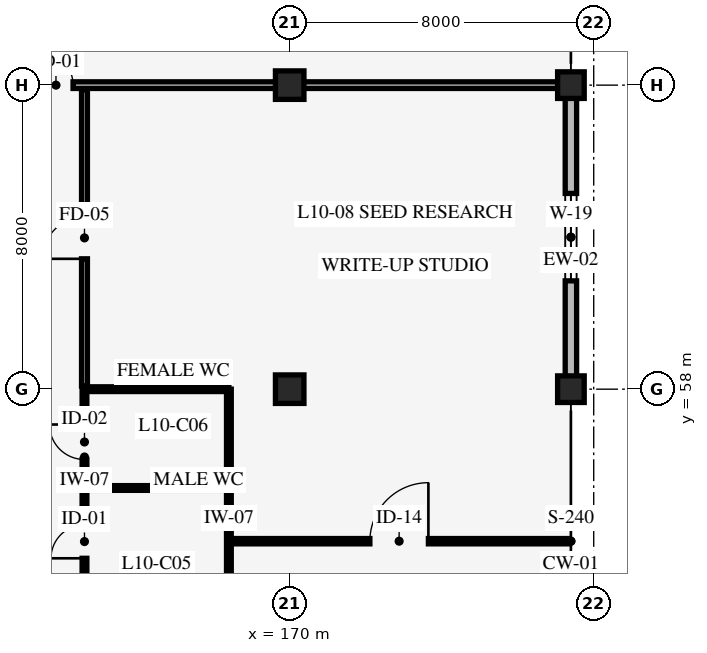
"""IFC4 building model, lengths in metres.
Left out: names, types, materials, properties, quantities, classifications, styles, units other than length and angle.
Written with IfcOpenShell. Run it as: python <this file> out.ifc"""

import sys

from ifc_helpers import new_model, si_unit, direction, frame, frame_2d, origin, origin_2d, place, context, subcontext, project, spatial, rectangle, extrude, element, fill, save


model = new_model("IFC4")
c1 = context("Model", 3, precision=1e-05, world=origin(), true_north=direction((0.0, 1.0)))
c2 = subcontext(c1, "Body", "Model", "MODEL_VIEW")
j1 = project(units=[si_unit("LENGTHUNIT", "METRE"), si_unit("PLANEANGLEUNIT", "RADIAN")], contexts=[c1])
p1 = place(None, origin())
s1 = spatial("IfcSite", under=j1, at=p1, CompositionType="ELEMENT")
p2 = place(p1, origin())
s2 = spatial("IfcBuilding", under=s1, at=p2, CompositionType="ELEMENT")
p3 = place(p2, frame((0.0, 0.0, 40.2)))
s3 = spatial("IfcBuildingStorey", under=s2, at=p3, CompositionType="ELEMENT", Elevation=40.2)
for number, where, z_axis, x_axis in (
    (1, (170.0, 58.0, 0.0), (0.0, 0.0, 1.0), (1.0, 0.0, 0.0)),
    (2, (170.0, 66.0, 0.0), (0.0, 0.0, 1.0), (1.0, 0.0, 0.0)),
):
    element("IfcColumn", number, at=place(p3, frame(where, z_axis=z_axis, x_axis=x_axis)), inside=s3, PredefinedType="COLUMN", context=c2, shape_type="SweptSolid", body=[
        extrude(rectangle(XDim=0.75, YDim=0.75, at=origin_2d()), origin(), (0.0, 0.0, 1.0), 4.2),
    ])
for number, where, z_axis, x_axis in (
    (3, (177.4, 58.0, 0.0), (0.0, 0.0, 1.0), (1.0, 0.0, 0.0)),
    (4, (177.4, 66.0, 0.0), (0.0, 0.0, 1.0), (1.0, 0.0, 0.0)),
):
    element("IfcColumn", number, at=place(p3, frame(where, z_axis=z_axis, x_axis=x_axis)), inside=s3, PredefinedType="COLUMN", context=c2, shape_type="SweptSolid", body=[
        extrude(rectangle(XDim=0.7, YDim=0.7, at=origin_2d()), origin(), (0.0, 0.0, 1.0), 4.2),
    ])
p4 = place(p3, frame((177.4, 66.0, 0.0), z_axis=(0.0, 0.0, 1.0), x_axis=(0.0, -1.0, 0.0)))
e5 = element("IfcWall", 5, at=p4, inside=s3, PredefinedType="STANDARD", context=c2, shape_type="SweptSolid", body=[
    extrude(rectangle(XDim=8.0, YDim=0.3, at=frame_2d((4.0, 0.0))), origin(), (0.0, 0.0, 1.0), 3.14),
])
p5 = place(p4, frame((2.85, 0.0, 0.85)))
e6 = element("IfcOpeningElement", 6, at=p5, cuts=e5, PredefinedType="OPENING", context=c2, shape_type="SweptSolid", body=[
    extrude(rectangle(XDim=2.3, YDim=1.5, at=frame_2d((1.15, 0.75))), frame((0.0, 0.16, 0.0), z_axis=(0.0, -1.0, 0.0), x_axis=(1.0, 0.0, 0.0)), (0.0, 0.0, 1.0), 0.32),
])
p6 = place(p3, frame((164.6, 50.0, 0.0), z_axis=(0.0, 0.0, 1.0), x_axis=(0.0, 1.0, 0.0)))
e7 = element("IfcWall", 7, at=p6, inside=s3, PredefinedType="STANDARD", context=c2, shape_type="SweptSolid", body=[
    extrude(rectangle(XDim=8.0, YDim=0.125, at=frame_2d((4.0, 0.0))), origin(), (0.0, 0.0, 1.0), 3.9),
])
p7 = place(p6, frame((0.9, 0.0, 0.0)))
e8 = element("IfcOpeningElement", 8, at=p7, cuts=e7, PredefinedType="OPENING", context=c2, shape_type="SweptSolid", body=[
    extrude(rectangle(XDim=0.96, YDim=2.08, at=frame_2d((0.48, 1.04))), frame((0.0, 0.073, 0.0), z_axis=(0.0, -1.0, 0.0), x_axis=(1.0, 0.0, 0.0)), (0.0, 0.0, 1.0), 0.145),
])
p8 = place(p6, frame((3.55, 0.0, 0.0)))
e9 = element("IfcOpeningElement", 9, at=p8, cuts=e7, PredefinedType="OPENING", context=c2, shape_type="SweptSolid", body=[
    extrude(rectangle(XDim=0.88, YDim=2.05, at=frame_2d((0.44, 1.025))), frame((0.0, 0.073, 0.0), z_axis=(0.0, -1.0, 0.0), x_axis=(1.0, 0.0, 0.0)), (0.0, 0.0, 1.0), 0.145),
])
p9 = place(p6, frame((6.15, 0.0, 0.0)))
e10 = element("IfcOpeningElement", 10, at=p9, cuts=e7, PredefinedType="OPENING", context=c2, shape_type="SweptSolid", body=[
    extrude(rectangle(XDim=0.92, YDim=2.05, at=frame_2d((0.46, 1.025))), frame((0.0, 0.073, 0.0), z_axis=(0.0, -1.0, 0.0), x_axis=(1.0, 0.0, 0.0)), (0.0, 0.0, 1.0), 0.145),
])
p10 = place(p3, frame((168.4, 50.0, 0.0), z_axis=(0.0, 0.0, 1.0), x_axis=(0.0, 1.0, 0.0)))
e11 = element("IfcWall", 11, at=p10, inside=s3, PredefinedType="STANDARD", context=c2, shape_type="SweptSolid", body=[
    extrude(rectangle(XDim=8.0, YDim=0.125, at=frame_2d((4.0, 0.0))), origin(), (0.0, 0.0, 1.0), 3.9),
])
p11 = place(p3, frame((164.6, 55.4, 0.0), z_axis=(0.0, 0.0, 1.0), x_axis=(1.0, 0.0, 0.0)))
e12 = element("IfcWall", 12, at=p11, inside=s3, PredefinedType="STANDARD", context=c2, shape_type="SweptSolid", body=[
    extrude(rectangle(XDim=3.8, YDim=0.125, at=frame_2d((1.9, 0.0))), origin(), (0.0, 0.0, 1.0), 3.9),
])
p12 = place(p3, frame((164.6, 58.0, 0.0), z_axis=(0.0, 0.0, 1.0), x_axis=(1.0, 0.0, 0.0)))
e13 = element("IfcWall", 13, at=p12, inside=s3, PredefinedType="STANDARD", context=c2, shape_type="SweptSolid", body=[
    extrude(rectangle(XDim=3.8, YDim=0.125, at=frame_2d((1.9, 0.0))), origin(), (0.0, 0.0, 1.0), 3.09),
])
p13 = place(p3, frame((168.4, 54.0, 0.0), z_axis=(0.0, 0.0, 1.0), x_axis=(1.0, 0.0, 0.0)))
e14 = element("IfcWall", 14, at=p13, inside=s3, PredefinedType="STANDARD", context=c2, shape_type="SweptSolid", body=[
    extrude(rectangle(XDim=8.96, YDim=0.14, at=frame_2d((4.48, 0.0))), origin(), (0.0, 0.0, 1.0), 3.9),
])
p14 = place(p13, frame((3.71, 0.0, 0.0)))
e15 = element("IfcOpeningElement", 15, at=p14, cuts=e14, PredefinedType="OPENING", context=c2, shape_type="SweptSolid", body=[
    extrude(rectangle(XDim=1.54, YDim=2.22, at=frame_2d((0.77, 1.11))), frame((0.0, 0.08, 0.0), z_axis=(0.0, -1.0, 0.0), x_axis=(1.0, 0.0, 0.0)), (0.0, 0.0, 1.0), 0.16),
])
p15 = place(p3, frame((164.6, 58.08, 0.0), z_axis=(0.0, 0.0, 1.0), x_axis=(0.0, 1.0, 0.0)))
e16 = element("IfcWall", 16, at=p15, inside=s3, PredefinedType="STANDARD", context=c2, shape_type="SweptSolid", body=[
    extrude(rectangle(XDim=7.8, YDim=0.155, at=frame_2d((3.9, 0.0))), origin(), (0.0, 0.0, 1.0), 3.9),
])
p16 = place(p15, frame((3.35, 0.0, 0.0)))
e17 = element("IfcOpeningElement", 17, at=p16, cuts=e16, PredefinedType="OPENING", context=c2, shape_type="SweptSolid", body=[
    extrude(rectangle(XDim=1.1, YDim=2.1, at=frame_2d((0.55, 1.05))), frame((0.0, 0.087, 0.0), z_axis=(0.0, -1.0, 0.0), x_axis=(1.0, 0.0, 0.0)), (0.0, 0.0, 1.0), 0.175),
])
p17 = place(p3, frame((162.35, 66.0, 0.0), z_axis=(0.0, 0.0, 1.0), x_axis=(1.0, 0.0, 0.0)))
e18 = element("IfcWall", 18, at=p17, inside=s3, PredefinedType="STANDARD", context=c2, shape_type="SweptSolid", body=[
    extrude(rectangle(XDim=14.7, YDim=0.175, at=frame_2d((7.35, 0.0))), origin(), (0.0, 0.0, 1.0), 3.09),
])
p18 = place(p17, frame((1.05, 0.0, 0.0)))
e19 = element("IfcOpeningElement", 19, at=p18, cuts=e18, PredefinedType="OPENING", context=c2, shape_type="SweptSolid", body=[
    extrude(rectangle(XDim=0.9, YDim=2.1, at=frame_2d((0.45, 1.05))), frame((0.0, 0.098, 0.0), z_axis=(0.0, -1.0, 0.0), x_axis=(1.0, 0.0, 0.0)), (0.0, 0.0, 1.0), 0.195),
])
p19 = place(p5, origin())
e20 = element("IfcWindow", 20, at=p19, inside=s3, PartitioningType="SINGLE_PANEL", PredefinedType="WINDOW", context=c2, shape_type="SweptSolid", body=[
    extrude(rectangle(XDim=2.3, YDim=1.5, at=frame_2d((1.15, 0.75))), frame((0.0, 0.03, 0.0), z_axis=(0.0, -1.0, 0.0), x_axis=(1.0, 0.0, 0.0)), (0.0, 0.0, 1.0), 0.06),
])
fill(e6, e20)
p20 = place(p8, origin())
e21 = element("IfcDoor", 21, at=p20, inside=s3, OperationType="SINGLE_SWING_LEFT", PredefinedType="DOOR", context=c2, shape_type="SweptSolid", body=[
    extrude(rectangle(XDim=0.88, YDim=2.05, at=frame_2d((0.44, 1.025))), frame((0.0, 0.025, 0.0), z_axis=(0.0, -1.0, 0.0), x_axis=(1.0, 0.0, 0.0)), (0.0, 0.0, 1.0), 0.05),
])
fill(e9, e21)
p21 = place(p9, origin())
e22 = element("IfcDoor", 22, at=p21, inside=s3, OperationType="SINGLE_SWING_RIGHT", PredefinedType="DOOR", context=c2, shape_type="SweptSolid", body=[
    extrude(rectangle(XDim=0.92, YDim=2.05, at=frame_2d((0.46, 1.025))), frame((0.0, 0.025, 0.0), z_axis=(0.0, -1.0, 0.0), x_axis=(1.0, 0.0, 0.0)), (0.0, 0.0, 1.0), 0.05),
])
fill(e10, e22)
p22 = place(p14, origin())
e23 = element("IfcDoor", 23, at=p22, inside=s3, OperationType="SINGLE_SWING_RIGHT", PredefinedType="DOOR", context=c2, shape_type="SweptSolid", body=[
    extrude(rectangle(XDim=1.54, YDim=2.22, at=frame_2d((0.77, 1.11))), frame((0.0, 0.025, 0.0), z_axis=(0.0, -1.0, 0.0), x_axis=(1.0, 0.0, 0.0)), (0.0, 0.0, 1.0), 0.05),
])
fill(e15, e23)
p23 = place(p16, origin())
e24 = element("IfcDoor", 24, at=p23, inside=s3, OperationType="SINGLE_SWING_LEFT", PredefinedType="DOOR", context=c2, shape_type="SweptSolid", body=[
    extrude(rectangle(XDim=1.1, YDim=2.1, at=frame_2d((0.55, 1.05))), frame((0.0, 0.025, 0.0), z_axis=(0.0, -1.0, 0.0), x_axis=(1.0, 0.0, 0.0)), (0.0, 0.0, 1.0), 0.05),
])
fill(e17, e24)
p24 = place(p18, origin())
e25 = element("IfcDoor", 25, at=p24, inside=s3, OperationType="SINGLE_SWING_LEFT", PredefinedType="DOOR", context=c2, shape_type="SweptSolid", body=[
    extrude(rectangle(XDim=0.9, YDim=2.1, at=frame_2d((0.45, 1.05))), frame((0.0, 0.025, 0.0), z_axis=(0.0, -1.0, 0.0), x_axis=(1.0, 0.0, 0.0)), (0.0, 0.0, 1.0), 0.05),
])
fill(e19, e25)
save(model, sys.argv[1])
